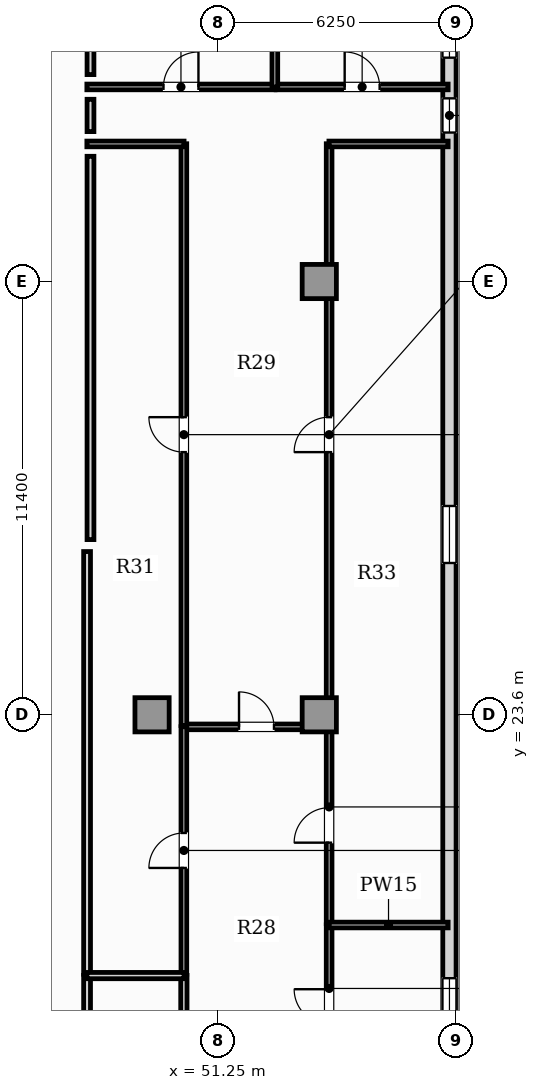
"""IFC4 building model, lengths in metres.
Left out: names, types, materials, properties, quantities, classifications, styles, units other than length and angle.
Written with IfcOpenShell. Run it as: python <this file> out.ifc"""

import sys

from ifc_helpers import new_model, si_unit, direction, frame, frame_2d, origin, origin_2d, place, context, subcontext, project, spatial, rectangle, extrude, element, fill, save


model = new_model("IFC4")
c1 = context("Model", 3, precision=1e-05, world=origin(), true_north=direction((0.0, 1.0)))
c2 = subcontext(c1, "Body", "Model", "MODEL_VIEW")
j1 = project(units=[si_unit("LENGTHUNIT", "METRE"), si_unit("PLANEANGLEUNIT", "RADIAN")], contexts=[c1])
p1 = place(None, origin())
s1 = spatial("IfcSite", under=j1, at=p1, CompositionType="ELEMENT")
p2 = place(p1, origin())
s2 = spatial("IfcBuilding", under=s1, at=p2, CompositionType="ELEMENT")
p3 = place(p2, frame((0.0, 0.0, 72.15)))
s3 = spatial("IfcBuildingStorey", under=s2, at=p3, CompositionType="ELEMENT", Elevation=72.15)
for number, where, z_axis, x_axis in (
    (1, (49.5, 23.6, 0.0), (0.0, 0.0, 1.0), (1.0, 0.0, 0.0)),
    (2, (53.9, 23.6, 0.0), (0.0, 0.0, 1.0), (1.0, 0.0, 0.0)),
    (3, (53.9, 35.0, 0.0), (0.0, 0.0, 1.0), (1.0, 0.0, 0.0)),
):
    element("IfcColumn", number, at=place(p3, frame(where, z_axis=z_axis, x_axis=x_axis)), inside=s3, PredefinedType="COLUMN", context=c2, shape_type="SweptSolid", body=[
        extrude(rectangle(XDim=0.9, YDim=0.9, at=origin_2d()), origin(), (0.0, 0.0, 1.0), 3.85),
    ])
p4 = place(p3, frame((57.325, 3.24, 0.0), z_axis=(0.0, 0.0, 1.0), x_axis=(0.0, 1.0, 0.0)))
e4 = element("IfcWall", 4, at=p4, inside=s3, PredefinedType="SOLIDWALL", context=c2, shape_type="SweptSolid", body=[
    extrude(rectangle(XDim=39.92, YDim=0.35, at=frame_2d((19.96, 0.0))), origin(), (0.0, 0.0, 1.0), 3.57),
])
p5 = place(p4, frame((35.68, 0.0, 0.95)))
e5 = element("IfcOpeningElement", 5, at=p5, cuts=e4, PredefinedType="OPENING", context=c2, shape_type="SweptSolid", body=[
    extrude(rectangle(XDim=0.9, YDim=1.5, at=frame_2d((0.45, 0.75))), frame((0.0, 0.185, 0.0), z_axis=(0.0, -1.0, 0.0), x_axis=(1.0, 0.0, 0.0)), (0.0, 0.0, 1.0), 0.37),
])
p6 = place(p4, frame((11.929, 0.0, 0.9)))
e6 = element("IfcOpeningElement", 6, at=p6, cuts=e4, PredefinedType="OPENING", context=c2, shape_type="SweptSolid", body=[
    extrude(rectangle(XDim=1.5, YDim=1.95, at=frame_2d((0.75, 0.975))), frame((0.0, 0.185, 0.0), z_axis=(0.0, -1.0, 0.0), x_axis=(1.0, 0.0, 0.0)), (0.0, 0.0, 1.0), 0.37),
])
p7 = place(p4, frame((24.354, 0.0, 0.9)))
e7 = element("IfcOpeningElement", 7, at=p7, cuts=e4, PredefinedType="OPENING", context=c2, shape_type="SweptSolid", body=[
    extrude(rectangle(XDim=1.5, YDim=1.95, at=frame_2d((0.75, 0.975))), frame((0.0, 0.185, 0.0), z_axis=(0.0, -1.0, 0.0), x_axis=(1.0, 0.0, 0.0)), (0.0, 0.0, 1.0), 0.37),
])
p8 = place(p4, frame((37.65, 0.0, 0.9)))
e8 = element("IfcOpeningElement", 8, at=p8, cuts=e4, PredefinedType="OPENING", context=c2, shape_type="SweptSolid", body=[
    extrude(rectangle(XDim=1.5, YDim=1.95, at=frame_2d((0.75, 0.975))), frame((0.0, 0.185, 0.0), z_axis=(0.0, -1.0, 0.0), x_axis=(1.0, 0.0, 0.0)), (0.0, 0.0, 1.0), 0.37),
])
p9 = place(p3, frame((47.79, 13.765, 0.0), z_axis=(0.0, 0.0, 1.0), x_axis=(0.0, 1.0, 0.0)))
e9 = element("IfcWall", 9, at=p9, inside=s3, PredefinedType="PARTITIONING", context=c2, shape_type="SweptSolid", body=[
    extrude(rectangle(XDim=2.978, YDim=0.18, at=frame_2d((1.489, 0.0))), origin(), (0.0, 0.0, 1.0), 3.57),
])
p10 = place(p3, frame((47.79, 16.773, 0.0), z_axis=(0.0, 0.0, 1.0), x_axis=(0.0, 1.0, 0.0)))
e10 = element("IfcWall", 10, at=p10, inside=s3, PredefinedType="PARTITIONING", context=c2, shape_type="SweptSolid", body=[
    extrude(rectangle(XDim=11.122, YDim=0.18, at=frame_2d((5.561, 0.0))), origin(), (0.0, 0.0, 1.0), 3.57),
])
p11 = place(p3, frame((50.332, 23.282, 0.0), z_axis=(0.0, 0.0, 1.0), x_axis=(1.0, 0.0, 0.0)))
e11 = element("IfcWall", 11, at=p11, inside=s3, PredefinedType="PARTITIONING", context=c2, shape_type="SweptSolid", body=[
    extrude(rectangle(XDim=3.832, YDim=0.15, at=frame_2d((1.916, 0.0))), origin(), (0.0, 0.0, 1.0), 3.57),
])
p12 = place(p11, frame((1.456, 0.0, 0.0)))
e12 = element("IfcOpeningElement", 12, at=p12, cuts=e11, PredefinedType="OPENING", context=c2, shape_type="SweptSolid", body=[
    extrude(rectangle(XDim=0.92, YDim=2.1, at=frame_2d((0.46, 1.05))), frame((0.0, 0.085, 0.0), z_axis=(0.0, -1.0, 0.0), x_axis=(1.0, 0.0, 0.0)), (0.0, 0.0, 1.0), 0.17),
])
p13 = place(p3, frame((50.337, 13.765, 0.0), z_axis=(0.0, 0.0, 1.0), x_axis=(0.0, 1.0, 0.0)))
e13 = element("IfcWall", 13, at=p13, inside=s3, PredefinedType="PLUMBINGWALL", context=c2, shape_type="SweptSolid", body=[
    extrude(rectangle(XDim=2.978, YDim=0.165, at=frame_2d((1.489, 0.0))), origin(), (0.0, 0.0, 1.0), 3.57),
])
p14 = place(p13, frame((1.064, 0.0, 0.0)))
e14 = element("IfcOpeningElement", 14, at=p14, cuts=e13, PredefinedType="OPENING", context=c2, shape_type="SweptSolid", body=[
    extrude(rectangle(XDim=0.85, YDim=2.1, at=frame_2d((0.425, 1.05))), frame((0.0, 0.093, 0.0), z_axis=(0.0, -1.0, 0.0), x_axis=(1.0, 0.0, 0.0)), (0.0, 0.0, 1.0), 0.185),
])
p15 = place(p3, frame((50.337, 16.773, 0.0), z_axis=(0.0, 0.0, 1.0), x_axis=(0.0, 1.0, 0.0)))
e15 = element("IfcWall", 15, at=p15, inside=s3, PredefinedType="PARTITIONING", context=c2, shape_type="SweptSolid", body=[
    extrude(rectangle(XDim=6.514, YDim=0.15, at=frame_2d((3.257, 0.0))), origin(), (0.0, 0.0, 1.0), 3.57),
])
p16 = place(p15, frame((2.797, 0.0, 0.0)))
e16 = element("IfcOpeningElement", 16, at=p16, cuts=e15, PredefinedType="OPENING", context=c2, shape_type="SweptSolid", body=[
    extrude(rectangle(XDim=0.92, YDim=2.1, at=frame_2d((0.46, 1.05))), frame((0.0, 0.085, 0.0), z_axis=(0.0, -1.0, 0.0), x_axis=(1.0, 0.0, 0.0)), (0.0, 0.0, 1.0), 0.17),
])
p17 = place(p3, frame((54.159, 13.765, 0.0), z_axis=(0.0, 0.0, 1.0), x_axis=(0.0, 1.0, 0.0)))
e17 = element("IfcWall", 17, at=p17, inside=s3, PredefinedType="PARTITIONING", context=c2, shape_type="SweptSolid", body=[
    extrude(rectangle(XDim=4.309, YDim=0.15, at=frame_2d((2.154, 0.0))), origin(), (0.0, 0.0, 1.0), 3.57),
])
p18 = place(p17, frame((1.694, 0.0, 0.0)))
e18 = element("IfcOpeningElement", 18, at=p18, cuts=e17, PredefinedType="OPENING", context=c2, shape_type="SweptSolid", body=[
    extrude(rectangle(XDim=0.92, YDim=2.1, at=frame_2d((0.46, 1.05))), frame((0.0, 0.085, 0.0), z_axis=(0.0, -1.0, 0.0), x_axis=(1.0, 0.0, 0.0)), (0.0, 0.0, 1.0), 0.17),
])
p19 = place(p3, frame((54.159, 18.104, 0.0), z_axis=(0.0, 0.0, 1.0), x_axis=(0.0, 1.0, 0.0)))
e19 = element("IfcWall", 19, at=p19, inside=s3, PredefinedType="PARTITIONING", context=c2, shape_type="SweptSolid", body=[
    extrude(rectangle(XDim=5.184, YDim=0.15, at=frame_2d((2.592, 0.0))), origin(), (0.0, 0.0, 1.0), 3.57),
])
p20 = place(p19, frame((2.132, 0.0, 0.0)))
e20 = element("IfcOpeningElement", 20, at=p20, cuts=e19, PredefinedType="OPENING", context=c2, shape_type="SweptSolid", body=[
    extrude(rectangle(XDim=0.92, YDim=2.1, at=frame_2d((0.46, 1.05))), frame((0.0, 0.085, 0.0), z_axis=(0.0, -1.0, 0.0), x_axis=(1.0, 0.0, 0.0)), (0.0, 0.0, 1.0), 0.17),
])
p21 = place(p3, frame((50.337, 23.317, 0.0), z_axis=(0.0, 0.0, 1.0), x_axis=(0.0, 1.0, 0.0)))
e21 = element("IfcWall", 21, at=p21, inside=s3, PredefinedType="PARTITIONING", context=c2, shape_type="SweptSolid", body=[
    extrude(rectangle(XDim=15.308, YDim=0.15, at=frame_2d((7.654, 0.0))), origin(), (0.0, 0.0, 1.0), 3.57),
])
p22 = place(p21, frame((7.194, 0.0, 0.0)))
e22 = element("IfcOpeningElement", 22, at=p22, cuts=e21, PredefinedType="OPENING", context=c2, shape_type="SweptSolid", body=[
    extrude(rectangle(XDim=0.92, YDim=2.1, at=frame_2d((0.46, 1.05))), frame((0.0, 0.085, 0.0), z_axis=(0.0, -1.0, 0.0), x_axis=(1.0, 0.0, 0.0)), (0.0, 0.0, 1.0), 0.17),
])
p23 = place(p3, frame((47.785, 38.62, 0.0), z_axis=(0.0, 0.0, 1.0), x_axis=(1.0, 0.0, 0.0)))
e23 = element("IfcWall", 23, at=p23, inside=s3, PredefinedType="PARTITIONING", context=c2, shape_type="SweptSolid", body=[
    extrude(rectangle(XDim=2.557, YDim=0.15, at=frame_2d((1.279, 0.0))), origin(), (0.0, 0.0, 1.0), 3.57),
])
p24 = place(p3, frame((54.159, 23.317, 0.0), z_axis=(0.0, 0.0, 1.0), x_axis=(0.0, 1.0, 0.0)))
e24 = element("IfcWall", 24, at=p24, inside=s3, PredefinedType="PARTITIONING", context=c2, shape_type="SweptSolid", body=[
    extrude(rectangle(XDim=15.308, YDim=0.15, at=frame_2d((7.654, 0.0))), origin(), (0.0, 0.0, 1.0), 3.57),
])
p25 = place(p24, frame((7.194, 0.0, 0.0)))
e25 = element("IfcOpeningElement", 25, at=p25, cuts=e24, PredefinedType="OPENING", context=c2, shape_type="SweptSolid", body=[
    extrude(rectangle(XDim=0.92, YDim=2.1, at=frame_2d((0.46, 1.05))), frame((0.0, 0.085, 0.0), z_axis=(0.0, -1.0, 0.0), x_axis=(1.0, 0.0, 0.0)), (0.0, 0.0, 1.0), 0.17),
])
p26 = place(p3, frame((54.154, 38.62, 0.0), z_axis=(0.0, 0.0, 1.0), x_axis=(1.0, 0.0, 0.0)))
e26 = element("IfcWall", 26, at=p26, inside=s3, PredefinedType="PARTITIONING", context=c2, shape_type="SweptSolid", body=[
    extrude(rectangle(XDim=3.136, YDim=0.15, at=frame_2d((1.568, 0.0))), origin(), (0.0, 0.0, 1.0), 3.57),
])
p27 = place(p3, frame((47.785, 40.12, 0.0), z_axis=(0.0, 0.0, 1.0), x_axis=(1.0, 0.0, 0.0)))
e27 = element("IfcWall", 27, at=p27, inside=s3, PredefinedType="PARTITIONING", context=c2, shape_type="SweptSolid", body=[
    extrude(rectangle(XDim=4.951, YDim=0.15, at=frame_2d((2.476, 0.0))), origin(), (0.0, 0.0, 1.0), 3.57),
])
p28 = place(p27, frame((2.016, 0.0, 0.0)))
e28 = element("IfcOpeningElement", 28, at=p28, cuts=e27, PredefinedType="OPENING", context=c2, shape_type="SweptSolid", body=[
    extrude(rectangle(XDim=0.92, YDim=2.1, at=frame_2d((0.46, 1.05))), frame((0.0, 0.085, 0.0), z_axis=(0.0, -1.0, 0.0), x_axis=(1.0, 0.0, 0.0)), (0.0, 0.0, 1.0), 0.17),
])
p29 = place(p3, frame((52.766, 40.12, 0.0), z_axis=(0.0, 0.0, 1.0), x_axis=(1.0, 0.0, 0.0)))
e29 = element("IfcWall", 29, at=p29, inside=s3, PredefinedType="PARTITIONING", context=c2, shape_type="SweptSolid", body=[
    extrude(rectangle(XDim=4.524, YDim=0.15, at=frame_2d((2.262, 0.0))), origin(), (0.0, 0.0, 1.0), 3.57),
])
p30 = place(p29, frame((1.802, 0.0, 0.0)))
e30 = element("IfcOpeningElement", 30, at=p30, cuts=e29, PredefinedType="OPENING", context=c2, shape_type="SweptSolid", body=[
    extrude(rectangle(XDim=0.92, YDim=2.1, at=frame_2d((0.46, 1.05))), frame((0.0, 0.085, 0.0), z_axis=(0.0, -1.0, 0.0), x_axis=(1.0, 0.0, 0.0)), (0.0, 0.0, 1.0), 0.17),
])
p31 = place(p3, frame((47.785, 16.738, 0.0), z_axis=(0.0, 0.0, 1.0), x_axis=(1.0, 0.0, 0.0)))
e31 = element("IfcWall", 31, at=p31, inside=s3, PredefinedType="PLUMBINGWALL", context=c2, shape_type="SweptSolid", body=[
    extrude(rectangle(XDim=2.557, YDim=0.165, at=frame_2d((1.279, 0.0))), origin(), (0.0, 0.0, 1.0), 3.57),
])
p32 = place(p3, frame((54.154, 18.069, 0.0), z_axis=(0.0, 0.0, 1.0), x_axis=(1.0, 0.0, 0.0)))
e32 = element("IfcWall", 32, at=p32, inside=s3, PredefinedType="PARTITIONING", context=c2, shape_type="SweptSolid", body=[
    extrude(rectangle(XDim=3.136, YDim=0.15, at=frame_2d((1.568, 0.0))), origin(), (0.0, 0.0, 1.0), 3.57),
])
p33 = place(p3, frame((52.731, 40.115, 0.0), z_axis=(0.0, 0.0, 1.0), x_axis=(0.0, 1.0, 0.0)))
e33 = element("IfcWall", 33, at=p33, inside=s3, PredefinedType="PARTITIONING", context=c2, shape_type="SweptSolid", body=[
    extrude(rectangle(XDim=6.075, YDim=0.15, at=frame_2d((3.038, 0.0))), origin(), (0.0, 0.0, 1.0), 3.57),
])
p34 = place(p3, frame((47.88, 38.945, 0.0), z_axis=(0.0, 0.0, 1.0), x_axis=(0.0, 1.0, 0.0)))
e34 = element("IfcWall", 34, at=p34, inside=s3, PredefinedType="PARTITIONING", context=c2, shape_type="SweptSolid", body=[
    extrude(rectangle(XDim=0.85, YDim=0.18, at=frame_2d((0.425, 0.0))), origin(), (0.0, 0.0, 1.0), 3.57),
])
p35 = place(p3, frame((47.88, 28.21, 0.0), z_axis=(0.0, 0.0, 1.0), x_axis=(0.0, 1.0, 0.0)))
e35 = element("IfcWall", 35, at=p35, inside=s3, PredefinedType="PARTITIONING", context=c2, shape_type="SweptSolid", body=[
    extrude(rectangle(XDim=10.085, YDim=0.18, at=frame_2d((5.042, 0.0))), origin(), (0.0, 0.0, 1.0), 3.57),
])
p36 = place(p3, frame((47.88, 40.445, 0.0), z_axis=(0.0, 0.0, 1.0), x_axis=(0.0, 1.0, 0.0)))
e36 = element("IfcWall", 36, at=p36, inside=s3, PredefinedType="PARTITIONING", context=c2, shape_type="SweptSolid", body=[
    extrude(rectangle(XDim=5.745, YDim=0.18, at=frame_2d((2.873, 0.0))), origin(), (0.0, 0.0, 1.0), 3.57),
])
p37 = place(p5, origin())
e37 = element("IfcWindow", 37, at=p37, inside=s3, PartitioningType="SINGLE_PANEL", PredefinedType="WINDOW", context=c2, shape_type="SweptSolid", body=[
    extrude(rectangle(XDim=0.9, YDim=1.5, at=frame_2d((0.45, 0.75))), frame((0.0, 0.03, 0.0), z_axis=(0.0, -1.0, 0.0), x_axis=(1.0, 0.0, 0.0)), (0.0, 0.0, 1.0), 0.06),
])
fill(e5, e37)
p38 = place(p6, origin())
e38 = element("IfcWindow", 38, at=p38, inside=s3, PartitioningType="SINGLE_PANEL", PredefinedType="WINDOW", context=c2, shape_type="SweptSolid", body=[
    extrude(rectangle(XDim=1.5, YDim=1.95, at=frame_2d((0.75, 0.975))), frame((0.0, 0.03, 0.0), z_axis=(0.0, -1.0, 0.0), x_axis=(1.0, 0.0, 0.0)), (0.0, 0.0, 1.0), 0.06),
])
fill(e6, e38)
p39 = place(p7, origin())
e39 = element("IfcWindow", 39, at=p39, inside=s3, PartitioningType="SINGLE_PANEL", PredefinedType="WINDOW", context=c2, shape_type="SweptSolid", body=[
    extrude(rectangle(XDim=1.5, YDim=1.95, at=frame_2d((0.75, 0.975))), frame((0.0, 0.03, 0.0), z_axis=(0.0, -1.0, 0.0), x_axis=(1.0, 0.0, 0.0)), (0.0, 0.0, 1.0), 0.06),
])
fill(e7, e39)
p40 = place(p8, origin())
e40 = element("IfcWindow", 40, at=p40, inside=s3, PartitioningType="SINGLE_PANEL", PredefinedType="WINDOW", context=c2, shape_type="SweptSolid", body=[
    extrude(rectangle(XDim=1.5, YDim=1.95, at=frame_2d((0.75, 0.975))), frame((0.0, 0.03, 0.0), z_axis=(0.0, -1.0, 0.0), x_axis=(1.0, 0.0, 0.0)), (0.0, 0.0, 1.0), 0.06),
])
fill(e8, e40)
p41 = place(p12, origin())
e41 = element("IfcDoor", 41, at=p41, inside=s3, OperationType="SINGLE_SWING_LEFT", PredefinedType="DOOR", context=c2, shape_type="SweptSolid", body=[
    extrude(rectangle(XDim=0.92, YDim=2.1, at=frame_2d((0.46, 1.05))), frame((0.0, 0.025, 0.0), z_axis=(0.0, -1.0, 0.0), x_axis=(1.0, 0.0, 0.0)), (0.0, 0.0, 1.0), 0.05),
])
fill(e12, e41)
p42 = place(p16, origin())
e42 = element("IfcDoor", 42, at=p42, inside=s3, OperationType="SINGLE_SWING_LEFT", PredefinedType="DOOR", context=c2, shape_type="SweptSolid", body=[
    extrude(rectangle(XDim=0.92, YDim=2.1, at=frame_2d((0.46, 1.05))), frame((0.0, 0.025, 0.0), z_axis=(0.0, -1.0, 0.0), x_axis=(1.0, 0.0, 0.0)), (0.0, 0.0, 1.0), 0.05),
])
fill(e16, e42)
p43 = place(p18, origin())
e43 = element("IfcDoor", 43, at=p43, inside=s3, OperationType="SINGLE_SWING_RIGHT", PredefinedType="DOOR", context=c2, shape_type="SweptSolid", body=[
    extrude(rectangle(XDim=0.92, YDim=2.1, at=frame_2d((0.46, 1.05))), frame((0.0, 0.025, 0.0), z_axis=(0.0, -1.0, 0.0), x_axis=(1.0, 0.0, 0.0)), (0.0, 0.0, 1.0), 0.05),
])
fill(e18, e43)
p44 = place(p20, origin())
e44 = element("IfcDoor", 44, at=p44, inside=s3, OperationType="SINGLE_SWING_LEFT", PredefinedType="DOOR", context=c2, shape_type="SweptSolid", body=[
    extrude(rectangle(XDim=0.92, YDim=2.1, at=frame_2d((0.46, 1.05))), frame((0.0, 0.025, 0.0), z_axis=(0.0, -1.0, 0.0), x_axis=(1.0, 0.0, 0.0)), (0.0, 0.0, 1.0), 0.05),
])
fill(e20, e44)
p45 = place(p22, origin())
e45 = element("IfcDoor", 45, at=p45, inside=s3, OperationType="SINGLE_SWING_RIGHT", PredefinedType="DOOR", context=c2, shape_type="SweptSolid", body=[
    extrude(rectangle(XDim=0.92, YDim=2.1, at=frame_2d((0.46, 1.05))), frame((0.0, 0.025, 0.0), z_axis=(0.0, -1.0, 0.0), x_axis=(1.0, 0.0, 0.0)), (0.0, 0.0, 1.0), 0.05),
])
fill(e22, e45)
p46 = place(p25, origin())
e46 = element("IfcDoor", 46, at=p46, inside=s3, OperationType="SINGLE_SWING_LEFT", PredefinedType="DOOR", context=c2, shape_type="SweptSolid", body=[
    extrude(rectangle(XDim=0.92, YDim=2.1, at=frame_2d((0.46, 1.05))), frame((0.0, 0.025, 0.0), z_axis=(0.0, -1.0, 0.0), x_axis=(1.0, 0.0, 0.0)), (0.0, 0.0, 1.0), 0.05),
])
fill(e25, e46)
p47 = place(p28, origin())
e47 = element("IfcDoor", 47, at=p47, inside=s3, OperationType="SINGLE_SWING_RIGHT", PredefinedType="DOOR", context=c2, shape_type="SweptSolid", body=[
    extrude(rectangle(XDim=0.92, YDim=2.1, at=frame_2d((0.46, 1.05))), frame((0.0, 0.025, 0.0), z_axis=(0.0, -1.0, 0.0), x_axis=(1.0, 0.0, 0.0)), (0.0, 0.0, 1.0), 0.05),
])
fill(e28, e47)
p48 = place(p30, origin())
e48 = element("IfcDoor", 48, at=p48, inside=s3, OperationType="SINGLE_SWING_LEFT", PredefinedType="DOOR", context=c2, shape_type="SweptSolid", body=[
    extrude(rectangle(XDim=0.92, YDim=2.1, at=frame_2d((0.46, 1.05))), frame((0.0, 0.025, 0.0), z_axis=(0.0, -1.0, 0.0), x_axis=(1.0, 0.0, 0.0)), (0.0, 0.0, 1.0), 0.05),
])
fill(e30, e48)
save(model, sys.argv[1])
